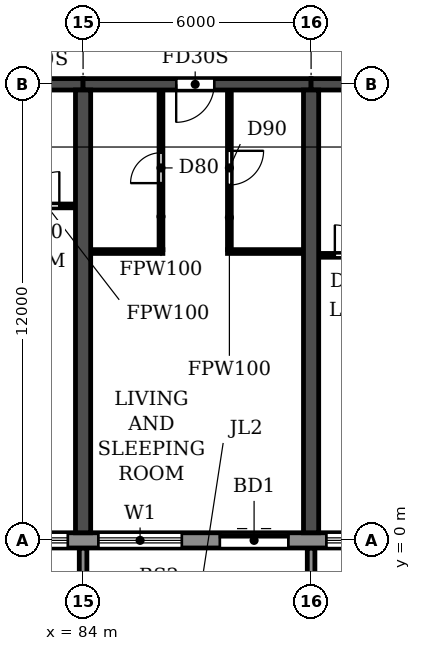
"""IFC4 building model, lengths in metres.
Left out: names, types, materials, properties, quantities, classifications, styles, units other than length and angle.
Written with IfcOpenShell. Run it as: python <this file> out.ifc"""

import sys

from ifc_helpers import new_model, si_unit, direction, frame, frame_2d, origin, place, context, subcontext, project, spatial, polyline, rectangle, outline, extrude, source, transform, mapped, element, fill, save


model = new_model("IFC4")
c1 = context("Model", 3, precision=1e-05, world=origin(), true_north=direction((0.0, 1.0)))
c2 = subcontext(c1, "Body", "Model", "MODEL_VIEW")
j1 = project(units=[si_unit("LENGTHUNIT", "METRE"), si_unit("PLANEANGLEUNIT", "RADIAN")], contexts=[c1])
p1 = place(None, origin())
s1 = spatial("IfcSite", under=j1, at=p1, CompositionType="ELEMENT")
p2 = place(p1, origin())
s2 = spatial("IfcBuilding", under=s1, at=p2, CompositionType="ELEMENT")
p3 = place(p2, frame((0.0, 0.0, 43.2)))
s3 = spatial("IfcBuildingStorey", under=s2, at=p3, CompositionType="ELEMENT", Elevation=43.2)
for number, where, z_axis, x_axis in (
    (1, (84.0, 0.2, 0.0), (0.0, 0.0, 1.0), (0.0, 1.0, 0.0)),
    (2, (90.0, 0.2, 0.0), (0.0, 0.0, 1.0), (0.0, 1.0, 0.0)),
):
    element("IfcWall", number, at=place(p3, frame(where, z_axis=z_axis, x_axis=x_axis)), inside=s3, PredefinedType="SHEAR", context=c2, shape_type="SweptSolid", body=[
        extrude(rectangle(XDim=11.65, YDim=0.4, at=frame_2d((5.825, 0.0))), origin(), (0.0, 0.0, 1.0), 3.05),
    ])
p4 = place(p3, frame((78.0, 12.0, 0.0), z_axis=(0.0, 0.0, 1.0), x_axis=(1.0, 0.0, 0.0)))
e3 = element("IfcWall", 3, at=p4, inside=s3, PredefinedType="SHEAR", context=c2, shape_type="SweptSolid", body=[
    extrude(rectangle(XDim=6.0, YDim=0.3, at=frame_2d((3.0, 0.0))), origin(), (0.0, 0.0, 1.0), 2.45),
])
p5 = place(p4, frame((2.45, 0.0, 0.0)))
e4 = element("IfcOpeningElement", 4, at=p5, cuts=e3, PredefinedType="OPENING", context=c2, shape_type="SweptSolid", body=[
    extrude(rectangle(XDim=1.0, YDim=2.1, at=frame_2d((0.5, 1.05))), frame((0.0, 0.16, 0.0), z_axis=(0.0, -1.0, 0.0), x_axis=(1.0, 0.0, 0.0)), (0.0, 0.0, 1.0), 0.32),
])
p6 = place(p3, frame((84.0, 12.0, 0.0), z_axis=(0.0, 0.0, 1.0), x_axis=(1.0, 0.0, 0.0)))
e5 = element("IfcWall", 5, at=p6, inside=s3, PredefinedType="SHEAR", context=c2, shape_type="SweptSolid", body=[
    extrude(rectangle(XDim=6.0, YDim=0.3, at=frame_2d((3.0, 0.0))), origin(), (0.0, 0.0, 1.0), 2.45),
])
p7 = place(p6, frame((2.45, 0.0, 0.0)))
e6 = element("IfcOpeningElement", 6, at=p7, cuts=e5, PredefinedType="OPENING", context=c2, shape_type="SweptSolid", body=[
    extrude(rectangle(XDim=1.0, YDim=2.1, at=frame_2d((0.5, 1.05))), frame((0.0, 0.16, 0.0), z_axis=(0.0, -1.0, 0.0), x_axis=(1.0, 0.0, 0.0)), (0.0, 0.0, 1.0), 0.32),
])
p8 = place(p3, frame((90.0, 12.0, 0.0), z_axis=(0.0, 0.0, 1.0), x_axis=(1.0, 0.0, 0.0)))
e7 = element("IfcWall", 7, at=p8, inside=s3, PredefinedType="SHEAR", context=c2, shape_type="SweptSolid", body=[
    extrude(rectangle(XDim=6.0, YDim=0.3, at=frame_2d((3.0, 0.0))), origin(), (0.0, 0.0, 1.0), 2.45),
])
p9 = place(p8, frame((2.45, 0.0, 0.0)))
e8 = element("IfcOpeningElement", 8, at=p9, cuts=e7, PredefinedType="OPENING", context=c2, shape_type="SweptSolid", body=[
    extrude(rectangle(XDim=1.0, YDim=2.1, at=frame_2d((0.5, 1.05))), frame((0.0, 0.16, 0.0), z_axis=(0.0, -1.0, 0.0), x_axis=(1.0, 0.0, 0.0)), (0.0, 0.0, 1.0), 0.32),
])
p10 = place(p3, frame((4.683, 0.0, 0.0), z_axis=(0.0, 0.0, 1.0), x_axis=(1.0, 0.0, 0.0)))
e9 = element("IfcWall", 9, at=p10, inside=s3, PredefinedType="STANDARD", context=c2, shape_type="SweptSolid", body=[
    extrude(rectangle(XDim=92.634, YDim=0.4, at=frame_2d((46.317, 0.0))), origin(), (0.0, 0.0, 1.0), 3.05),
])
p11 = place(p10, frame((1.717, 0.0, 0.9)))
e10 = element("IfcOpeningElement", 10, at=p11, cuts=e9, PredefinedType="OPENING", context=c2, shape_type="SweptSolid", body=[
    extrude(rectangle(XDim=2.2, YDim=1.5, at=frame_2d((1.1, 0.75))), frame((0.0, 0.21, 0.0), z_axis=(0.0, -1.0, 0.0), x_axis=(1.0, 0.0, 0.0)), (0.0, 0.0, 1.0), 0.42),
])
p12 = place(p10, frame((4.717, 0.0, 0.9)))
e11 = element("IfcOpeningElement", 11, at=p12, cuts=e9, PredefinedType="OPENING", context=c2, shape_type="SweptSolid", body=[
    extrude(rectangle(XDim=2.2, YDim=1.5, at=frame_2d((1.1, 0.75))), frame((0.0, 0.21, 0.0), z_axis=(0.0, -1.0, 0.0), x_axis=(1.0, 0.0, 0.0)), (0.0, 0.0, 1.0), 0.42),
])
p13 = place(p10, frame((7.717, 0.0, 0.9)))
e12 = element("IfcOpeningElement", 12, at=p13, cuts=e9, PredefinedType="OPENING", context=c2, shape_type="SweptSolid", body=[
    extrude(rectangle(XDim=2.2, YDim=1.5, at=frame_2d((1.1, 0.75))), frame((0.0, 0.21, 0.0), z_axis=(0.0, -1.0, 0.0), x_axis=(1.0, 0.0, 0.0)), (0.0, 0.0, 1.0), 0.42),
])
p14 = place(p10, frame((10.917, 0.0, 0.0)))
e13 = element("IfcOpeningElement", 13, at=p14, cuts=e9, PredefinedType="OPENING", context=c2, shape_type="SweptSolid", body=[
    extrude(rectangle(XDim=1.8, YDim=2.4, at=frame_2d((0.9, 1.2))), frame((0.0, 0.21, 0.0), z_axis=(0.0, -1.0, 0.0), x_axis=(1.0, 0.0, 0.0)), (0.0, 0.0, 1.0), 0.42),
])
p15 = place(p10, frame((13.717, 0.0, 0.9)))
e14 = element("IfcOpeningElement", 14, at=p15, cuts=e9, PredefinedType="OPENING", context=c2, shape_type="SweptSolid", body=[
    extrude(rectangle(XDim=2.2, YDim=1.5, at=frame_2d((1.1, 0.75))), frame((0.0, 0.21, 0.0), z_axis=(0.0, -1.0, 0.0), x_axis=(1.0, 0.0, 0.0)), (0.0, 0.0, 1.0), 0.42),
])
p16 = place(p10, frame((16.717, 0.0, 0.9)))
e15 = element("IfcOpeningElement", 15, at=p16, cuts=e9, PredefinedType="OPENING", context=c2, shape_type="SweptSolid", body=[
    extrude(rectangle(XDim=2.2, YDim=1.5, at=frame_2d((1.1, 0.75))), frame((0.0, 0.21, 0.0), z_axis=(0.0, -1.0, 0.0), x_axis=(1.0, 0.0, 0.0)), (0.0, 0.0, 1.0), 0.42),
])
p17 = place(p10, frame((19.917, 0.0, 0.0)))
e16 = element("IfcOpeningElement", 16, at=p17, cuts=e9, PredefinedType="OPENING", context=c2, shape_type="SweptSolid", body=[
    extrude(rectangle(XDim=1.8, YDim=2.4, at=frame_2d((0.9, 1.2))), frame((0.0, 0.21, 0.0), z_axis=(0.0, -1.0, 0.0), x_axis=(1.0, 0.0, 0.0)), (0.0, 0.0, 1.0), 0.42),
])
p18 = place(p10, frame((22.717, 0.0, 0.9)))
e17 = element("IfcOpeningElement", 17, at=p18, cuts=e9, PredefinedType="OPENING", context=c2, shape_type="SweptSolid", body=[
    extrude(rectangle(XDim=2.2, YDim=1.5, at=frame_2d((1.1, 0.75))), frame((0.0, 0.21, 0.0), z_axis=(0.0, -1.0, 0.0), x_axis=(1.0, 0.0, 0.0)), (0.0, 0.0, 1.0), 0.42),
])
p19 = place(p10, frame((25.717, 0.0, 0.9)))
e18 = element("IfcOpeningElement", 18, at=p19, cuts=e9, PredefinedType="OPENING", context=c2, shape_type="SweptSolid", body=[
    extrude(rectangle(XDim=2.2, YDim=1.5, at=frame_2d((1.1, 0.75))), frame((0.0, 0.21, 0.0), z_axis=(0.0, -1.0, 0.0), x_axis=(1.0, 0.0, 0.0)), (0.0, 0.0, 1.0), 0.42),
])
p20 = place(p10, frame((28.717, 0.0, 0.9)))
e19 = element("IfcOpeningElement", 19, at=p20, cuts=e9, PredefinedType="OPENING", context=c2, shape_type="SweptSolid", body=[
    extrude(rectangle(XDim=2.2, YDim=1.5, at=frame_2d((1.1, 0.75))), frame((0.0, 0.21, 0.0), z_axis=(0.0, -1.0, 0.0), x_axis=(1.0, 0.0, 0.0)), (0.0, 0.0, 1.0), 0.42),
])
p21 = place(p10, frame((31.717, 0.0, 0.9)))
e20 = element("IfcOpeningElement", 20, at=p21, cuts=e9, PredefinedType="OPENING", context=c2, shape_type="SweptSolid", body=[
    extrude(rectangle(XDim=2.2, YDim=1.5, at=frame_2d((1.1, 0.75))), frame((0.0, 0.21, 0.0), z_axis=(0.0, -1.0, 0.0), x_axis=(1.0, 0.0, 0.0)), (0.0, 0.0, 1.0), 0.42),
])
p22 = place(p10, frame((34.917, 0.0, 0.0)))
e21 = element("IfcOpeningElement", 21, at=p22, cuts=e9, PredefinedType="OPENING", context=c2, shape_type="SweptSolid", body=[
    extrude(rectangle(XDim=1.8, YDim=2.4, at=frame_2d((0.9, 1.2))), frame((0.0, 0.21, 0.0), z_axis=(0.0, -1.0, 0.0), x_axis=(1.0, 0.0, 0.0)), (0.0, 0.0, 1.0), 0.42),
])
p23 = place(p10, frame((37.717, 0.0, 0.9)))
e22 = element("IfcOpeningElement", 22, at=p23, cuts=e9, PredefinedType="OPENING", context=c2, shape_type="SweptSolid", body=[
    extrude(rectangle(XDim=2.2, YDim=1.5, at=frame_2d((1.1, 0.75))), frame((0.0, 0.21, 0.0), z_axis=(0.0, -1.0, 0.0), x_axis=(1.0, 0.0, 0.0)), (0.0, 0.0, 1.0), 0.42),
])
p24 = place(p10, frame((40.717, 0.0, 0.9)))
e23 = element("IfcOpeningElement", 23, at=p24, cuts=e9, PredefinedType="OPENING", context=c2, shape_type="SweptSolid", body=[
    extrude(rectangle(XDim=2.2, YDim=1.5, at=frame_2d((1.1, 0.75))), frame((0.0, 0.21, 0.0), z_axis=(0.0, -1.0, 0.0), x_axis=(1.0, 0.0, 0.0)), (0.0, 0.0, 1.0), 0.42),
])
p25 = place(p10, frame((43.717, 0.0, 0.9)))
e24 = element("IfcOpeningElement", 24, at=p25, cuts=e9, PredefinedType="OPENING", context=c2, shape_type="SweptSolid", body=[
    extrude(rectangle(XDim=2.2, YDim=1.5, at=frame_2d((1.1, 0.75))), frame((0.0, 0.21, 0.0), z_axis=(0.0, -1.0, 0.0), x_axis=(1.0, 0.0, 0.0)), (0.0, 0.0, 1.0), 0.42),
])
p26 = place(p10, frame((46.917, 0.0, 0.0)))
e25 = element("IfcOpeningElement", 25, at=p26, cuts=e9, PredefinedType="OPENING", context=c2, shape_type="SweptSolid", body=[
    extrude(rectangle(XDim=1.8, YDim=2.4, at=frame_2d((0.9, 1.2))), frame((0.0, 0.21, 0.0), z_axis=(0.0, -1.0, 0.0), x_axis=(1.0, 0.0, 0.0)), (0.0, 0.0, 1.0), 0.42),
])
p27 = place(p10, frame((49.717, 0.0, 0.9)))
e26 = element("IfcOpeningElement", 26, at=p27, cuts=e9, PredefinedType="OPENING", context=c2, shape_type="SweptSolid", body=[
    extrude(rectangle(XDim=2.2, YDim=1.5, at=frame_2d((1.1, 0.75))), frame((0.0, 0.21, 0.0), z_axis=(0.0, -1.0, 0.0), x_axis=(1.0, 0.0, 0.0)), (0.0, 0.0, 1.0), 0.42),
])
p28 = place(p10, frame((52.717, 0.0, 0.9)))
e27 = element("IfcOpeningElement", 27, at=p28, cuts=e9, PredefinedType="OPENING", context=c2, shape_type="SweptSolid", body=[
    extrude(rectangle(XDim=2.2, YDim=1.5, at=frame_2d((1.1, 0.75))), frame((0.0, 0.21, 0.0), z_axis=(0.0, -1.0, 0.0), x_axis=(1.0, 0.0, 0.0)), (0.0, 0.0, 1.0), 0.42),
])
p29 = place(p10, frame((55.717, 0.0, 0.9)))
e28 = element("IfcOpeningElement", 28, at=p29, cuts=e9, PredefinedType="OPENING", context=c2, shape_type="SweptSolid", body=[
    extrude(rectangle(XDim=2.2, YDim=1.5, at=frame_2d((1.1, 0.75))), frame((0.0, 0.21, 0.0), z_axis=(0.0, -1.0, 0.0), x_axis=(1.0, 0.0, 0.0)), (0.0, 0.0, 1.0), 0.42),
])
p30 = place(p10, frame((58.917, 0.0, 0.0)))
e29 = element("IfcOpeningElement", 29, at=p30, cuts=e9, PredefinedType="OPENING", context=c2, shape_type="SweptSolid", body=[
    extrude(rectangle(XDim=1.8, YDim=2.4, at=frame_2d((0.9, 1.2))), frame((0.0, 0.21, 0.0), z_axis=(0.0, -1.0, 0.0), x_axis=(1.0, 0.0, 0.0)), (0.0, 0.0, 1.0), 0.42),
])
p31 = place(p10, frame((61.717, 0.0, 0.9)))
e30 = element("IfcOpeningElement", 30, at=p31, cuts=e9, PredefinedType="OPENING", context=c2, shape_type="SweptSolid", body=[
    extrude(rectangle(XDim=2.2, YDim=1.5, at=frame_2d((1.1, 0.75))), frame((0.0, 0.21, 0.0), z_axis=(0.0, -1.0, 0.0), x_axis=(1.0, 0.0, 0.0)), (0.0, 0.0, 1.0), 0.42),
])
p32 = place(p10, frame((64.717, 0.0, 0.9)))
e31 = element("IfcOpeningElement", 31, at=p32, cuts=e9, PredefinedType="OPENING", context=c2, shape_type="SweptSolid", body=[
    extrude(rectangle(XDim=2.2, YDim=1.5, at=frame_2d((1.1, 0.75))), frame((0.0, 0.21, 0.0), z_axis=(0.0, -1.0, 0.0), x_axis=(1.0, 0.0, 0.0)), (0.0, 0.0, 1.0), 0.42),
])
p33 = place(p10, frame((67.717, 0.0, 0.9)))
e32 = element("IfcOpeningElement", 32, at=p33, cuts=e9, PredefinedType="OPENING", context=c2, shape_type="SweptSolid", body=[
    extrude(rectangle(XDim=2.2, YDim=1.5, at=frame_2d((1.1, 0.75))), frame((0.0, 0.21, 0.0), z_axis=(0.0, -1.0, 0.0), x_axis=(1.0, 0.0, 0.0)), (0.0, 0.0, 1.0), 0.42),
])
p34 = place(p10, frame((70.917, 0.0, 0.0)))
e33 = element("IfcOpeningElement", 33, at=p34, cuts=e9, PredefinedType="OPENING", context=c2, shape_type="SweptSolid", body=[
    extrude(rectangle(XDim=1.8, YDim=2.4, at=frame_2d((0.9, 1.2))), frame((0.0, 0.21, 0.0), z_axis=(0.0, -1.0, 0.0), x_axis=(1.0, 0.0, 0.0)), (0.0, 0.0, 1.0), 0.42),
])
p35 = place(p10, frame((73.717, 0.0, 0.9)))
e34 = element("IfcOpeningElement", 34, at=p35, cuts=e9, PredefinedType="OPENING", context=c2, shape_type="SweptSolid", body=[
    extrude(rectangle(XDim=2.2, YDim=1.5, at=frame_2d((1.1, 0.75))), frame((0.0, 0.21, 0.0), z_axis=(0.0, -1.0, 0.0), x_axis=(1.0, 0.0, 0.0)), (0.0, 0.0, 1.0), 0.42),
])
p36 = place(p10, frame((76.717, 0.0, 0.9)))
e35 = element("IfcOpeningElement", 35, at=p36, cuts=e9, PredefinedType="OPENING", context=c2, shape_type="SweptSolid", body=[
    extrude(rectangle(XDim=2.2, YDim=1.5, at=frame_2d((1.1, 0.75))), frame((0.0, 0.21, 0.0), z_axis=(0.0, -1.0, 0.0), x_axis=(1.0, 0.0, 0.0)), (0.0, 0.0, 1.0), 0.42),
])
p37 = place(p10, frame((79.717, 0.0, 0.9)))
e36 = element("IfcOpeningElement", 36, at=p37, cuts=e9, PredefinedType="OPENING", context=c2, shape_type="SweptSolid", body=[
    extrude(rectangle(XDim=2.2, YDim=1.5, at=frame_2d((1.1, 0.75))), frame((0.0, 0.21, 0.0), z_axis=(0.0, -1.0, 0.0), x_axis=(1.0, 0.0, 0.0)), (0.0, 0.0, 1.0), 0.42),
])
p38 = place(p10, frame((82.917, 0.0, 0.0)))
e37 = element("IfcOpeningElement", 37, at=p38, cuts=e9, PredefinedType="OPENING", context=c2, shape_type="SweptSolid", body=[
    extrude(rectangle(XDim=1.8, YDim=2.4, at=frame_2d((0.9, 1.2))), frame((0.0, 0.21, 0.0), z_axis=(0.0, -1.0, 0.0), x_axis=(1.0, 0.0, 0.0)), (0.0, 0.0, 1.0), 0.42),
])
p39 = place(p10, frame((85.717, 0.0, 0.9)))
e38 = element("IfcOpeningElement", 38, at=p39, cuts=e9, PredefinedType="OPENING", context=c2, shape_type="SweptSolid", body=[
    extrude(rectangle(XDim=2.2, YDim=1.5, at=frame_2d((1.1, 0.75))), frame((0.0, 0.21, 0.0), z_axis=(0.0, -1.0, 0.0), x_axis=(1.0, 0.0, 0.0)), (0.0, 0.0, 1.0), 0.42),
])
p40 = place(p10, frame((88.717, 0.0, 0.9)))
e39 = element("IfcOpeningElement", 39, at=p40, cuts=e9, PredefinedType="OPENING", context=c2, shape_type="SweptSolid", body=[
    extrude(rectangle(XDim=2.2, YDim=1.5, at=frame_2d((1.1, 0.75))), frame((0.0, 0.21, 0.0), z_axis=(0.0, -1.0, 0.0), x_axis=(1.0, 0.0, 0.0)), (0.0, 0.0, 1.0), 0.42),
])
m1 = source(origin(), c2, "Body", "SweptSolid", [
    extrude(outline(polyline([(0.0, 0.0), (0.2, 0.0), (0.2, 1.65), (0.0, 1.65), (0.0, 0.0)])), origin(), (0.0, 0.0, 1.0), 3.1),
])
for number, where in (
    (40, (83.9, -1.85, 0.0)),
    (41, (89.9, -1.85, 0.0)),
):
    element("IfcWall", number, at=place(p3, frame(where)), inside=s3, PredefinedType="STANDARD", context=c2, shape_type="MappedRepresentation", body=[
        mapped(m1, transform((0.0, 0.0, 0.0))),
    ])
p41 = place(p3, frame((90.21, 7.5, 0.0), z_axis=(0.0, 0.0, 1.0), x_axis=(1.0, 0.0, 0.0)))
e42 = element("IfcWall", 42, at=p41, inside=s3, PredefinedType="PARTITIONING", context=c2, shape_type="SweptSolid", body=[
    extrude(rectangle(XDim=1.89, YDim=0.1, at=frame_2d((0.945, 0.0))), origin(), (0.0, 0.0, 1.0), 3.05),
])
p42 = place(p41, frame((0.415, 0.0, 0.0)))
e43 = element("IfcOpeningElement", 43, at=p42, cuts=e42, PredefinedType="OPENING", context=c2, shape_type="SweptSolid", body=[
    extrude(rectangle(XDim=0.8, YDim=2.1, at=frame_2d((0.4, 1.05))), frame((0.0, 0.06, 0.0), z_axis=(0.0, -1.0, 0.0), x_axis=(1.0, 0.0, 0.0)), (0.0, 0.0, 1.0), 0.12),
])
p43 = place(p3, frame((84.21, 7.6, 0.0), z_axis=(0.0, 0.0, 1.0), x_axis=(1.0, 0.0, 0.0)))
e44 = element("IfcWall", 44, at=p43, inside=s3, PredefinedType="PARTITIONING", context=c2, shape_type="SweptSolid", body=[
    extrude(rectangle(XDim=1.89, YDim=0.1, at=frame_2d((0.945, 0.0))), origin(), (0.0, 0.0, 1.0), 3.05),
])
p44 = place(p3, frame((87.8, 7.6, 0.0), z_axis=(0.0, 0.0, 1.0), x_axis=(1.0, 0.0, 0.0)))
e45 = element("IfcWall", 45, at=p44, inside=s3, PredefinedType="PARTITIONING", context=c2, shape_type="SweptSolid", body=[
    extrude(rectangle(XDim=1.99, YDim=0.1, at=frame_2d((0.995, 0.0))), origin(), (0.0, 0.0, 1.0), 3.05),
])
p45 = place(p3, frame((81.8, 8.8, 0.0), z_axis=(0.0, 0.0, 1.0), x_axis=(1.0, 0.0, 0.0)))
e46 = element("IfcWall", 46, at=p45, inside=s3, PredefinedType="PARTITIONING", context=c2, shape_type="SweptSolid", body=[
    extrude(rectangle(XDim=1.99, YDim=0.1, at=frame_2d((0.995, 0.0))), origin(), (0.0, 0.0, 1.0), 3.05),
])
p46 = place(p45, frame((0.675, 0.0, 0.0)))
e47 = element("IfcOpeningElement", 47, at=p46, cuts=e46, PredefinedType="OPENING", context=c2, shape_type="SweptSolid", body=[
    extrude(rectangle(XDim=0.9, YDim=2.1, at=frame_2d((0.45, 1.05))), frame((0.0, 0.06, 0.0), z_axis=(0.0, -1.0, 0.0), x_axis=(1.0, 0.0, 0.0)), (0.0, 0.0, 1.0), 0.12),
])
p47 = place(p3, frame((86.05, 7.65, 0.0), z_axis=(0.0, 0.0, 1.0), x_axis=(0.0, 1.0, 0.0)))
e48 = element("IfcWall", 48, at=p47, inside=s3, PredefinedType="PARTITIONING", context=c2, shape_type="SweptSolid", body=[
    extrude(rectangle(XDim=4.19, YDim=0.1, at=frame_2d((2.095, 0.0))), origin(), (0.0, 0.0, 1.0), 3.05),
])
p48 = place(p47, frame((1.75, 0.0, 0.0)))
e49 = element("IfcOpeningElement", 49, at=p48, cuts=e48, PredefinedType="OPENING", context=c2, shape_type="SweptSolid", body=[
    extrude(rectangle(XDim=0.8, YDim=2.1, at=frame_2d((0.4, 1.05))), frame((0.0, 0.06, 0.0), z_axis=(0.0, -1.0, 0.0), x_axis=(1.0, 0.0, 0.0)), (0.0, 0.0, 1.0), 0.12),
])
p49 = place(p3, frame((87.85, 7.65, 0.0), z_axis=(0.0, 0.0, 1.0), x_axis=(0.0, 1.0, 0.0)))
e50 = element("IfcWall", 50, at=p49, inside=s3, PredefinedType="PARTITIONING", context=c2, shape_type="SweptSolid", body=[
    extrude(rectangle(XDim=4.19, YDim=0.1, at=frame_2d((2.095, 0.0))), origin(), (0.0, 0.0, 1.0), 3.05),
])
p50 = place(p49, frame((1.7, 0.0, 0.0)))
e51 = element("IfcOpeningElement", 51, at=p50, cuts=e50, PredefinedType="OPENING", context=c2, shape_type="SweptSolid", body=[
    extrude(rectangle(XDim=0.9, YDim=2.1, at=frame_2d((0.45, 1.05))), frame((0.0, 0.06, 0.0), z_axis=(0.0, -1.0, 0.0), x_axis=(1.0, 0.0, 0.0)), (0.0, 0.0, 1.0), 0.12),
])
p51 = place(p36, origin())
e52 = element("IfcWindow", 52, at=p51, inside=s3, PartitioningType="DOUBLE_PANEL_HORIZONTAL", PredefinedType="WINDOW", context=c2, shape_type="SweptSolid", body=[
    extrude(rectangle(XDim=2.2, YDim=1.5, at=frame_2d((1.1, 0.75))), frame((0.0, 0.03, 0.0), z_axis=(0.0, -1.0, 0.0), x_axis=(1.0, 0.0, 0.0)), (0.0, 0.0, 1.0), 0.06),
])
fill(e35, e52)
p52 = place(p37, origin())
e53 = element("IfcWindow", 53, at=p52, inside=s3, PartitioningType="DOUBLE_PANEL_HORIZONTAL", PredefinedType="WINDOW", context=c2, shape_type="SweptSolid", body=[
    extrude(rectangle(XDim=2.2, YDim=1.5, at=frame_2d((1.1, 0.75))), frame((0.0, 0.03, 0.0), z_axis=(0.0, -1.0, 0.0), x_axis=(1.0, 0.0, 0.0)), (0.0, 0.0, 1.0), 0.06),
])
fill(e36, e53)
p53 = place(p38, origin())
e54 = element("IfcDoor", 54, at=p53, inside=s3, OperationType="DOUBLE_DOOR_SLIDING", PredefinedType="DOOR", context=c2, shape_type="SweptSolid", body=[
    extrude(rectangle(XDim=1.8, YDim=2.4, at=frame_2d((0.9, 1.2))), frame((0.0, 0.025, 0.0), z_axis=(0.0, -1.0, 0.0), x_axis=(1.0, 0.0, 0.0)), (0.0, 0.0, 1.0), 0.05),
])
fill(e37, e54)
p54 = place(p39, origin())
e55 = element("IfcWindow", 55, at=p54, inside=s3, PartitioningType="DOUBLE_PANEL_HORIZONTAL", PredefinedType="WINDOW", context=c2, shape_type="SweptSolid", body=[
    extrude(rectangle(XDim=2.2, YDim=1.5, at=frame_2d((1.1, 0.75))), frame((0.0, 0.03, 0.0), z_axis=(0.0, -1.0, 0.0), x_axis=(1.0, 0.0, 0.0)), (0.0, 0.0, 1.0), 0.06),
])
fill(e38, e55)
p55 = place(p46, origin())
e56 = element("IfcDoor", 56, at=p55, inside=s3, OperationType="SINGLE_SWING_RIGHT", PredefinedType="DOOR", context=c2, shape_type="SweptSolid", body=[
    extrude(rectangle(XDim=0.9, YDim=2.1, at=frame_2d((0.45, 1.05))), frame((0.0, 0.025, 0.0), z_axis=(0.0, -1.0, 0.0), x_axis=(1.0, 0.0, 0.0)), (0.0, 0.0, 1.0), 0.05),
])
fill(e47, e56)
p56 = place(p48, origin())
e57 = element("IfcDoor", 57, at=p56, inside=s3, OperationType="SINGLE_SWING_LEFT", PredefinedType="DOOR", context=c2, shape_type="SweptSolid", body=[
    extrude(rectangle(XDim=0.8, YDim=2.1, at=frame_2d((0.4, 1.05))), frame((0.0, 0.025, 0.0), z_axis=(0.0, -1.0, 0.0), x_axis=(1.0, 0.0, 0.0)), (0.0, 0.0, 1.0), 0.05),
])
fill(e49, e57)
p57 = place(p7, frame((1.0, 0.0, 0.0), z_axis=(0.0, 0.0, 1.0), x_axis=(-1.0, 0.0, 0.0)))
e58 = element("IfcDoor", 58, at=p57, inside=s3, OperationType="SINGLE_SWING_RIGHT", PredefinedType="DOOR", context=c2, shape_type="SweptSolid", body=[
    extrude(rectangle(XDim=1.0, YDim=2.1, at=frame_2d((0.5, 1.05))), frame((0.0, 0.025, 0.0), z_axis=(0.0, -1.0, 0.0), x_axis=(1.0, 0.0, 0.0)), (0.0, 0.0, 1.0), 0.05),
])
fill(e6, e58)
p58 = place(p50, frame((0.9, 0.0, 0.0), z_axis=(0.0, 0.0, 1.0), x_axis=(-1.0, 0.0, 0.0)))
e59 = element("IfcDoor", 59, at=p58, inside=s3, OperationType="SINGLE_SWING_LEFT", PredefinedType="DOOR", context=c2, shape_type="SweptSolid", body=[
    extrude(rectangle(XDim=0.9, YDim=2.1, at=frame_2d((0.45, 1.05))), frame((0.0, 0.025, 0.0), z_axis=(0.0, -1.0, 0.0), x_axis=(1.0, 0.0, 0.0)), (0.0, 0.0, 1.0), 0.05),
])
fill(e51, e59)
p59 = place(p42, origin())
e60 = element("IfcDoor", 60, at=p59, inside=s3, OperationType="SINGLE_SWING_LEFT", PredefinedType="DOOR", context=c2, shape_type="SweptSolid", body=[
    extrude(rectangle(XDim=0.8, YDim=2.1, at=frame_2d((0.4, 1.05))), frame((0.0, 0.025, 0.0), z_axis=(0.0, -1.0, 0.0), x_axis=(1.0, 0.0, 0.0)), (0.0, 0.0, 1.0), 0.05),
])
fill(e43, e60)
save(model, sys.argv[1])
